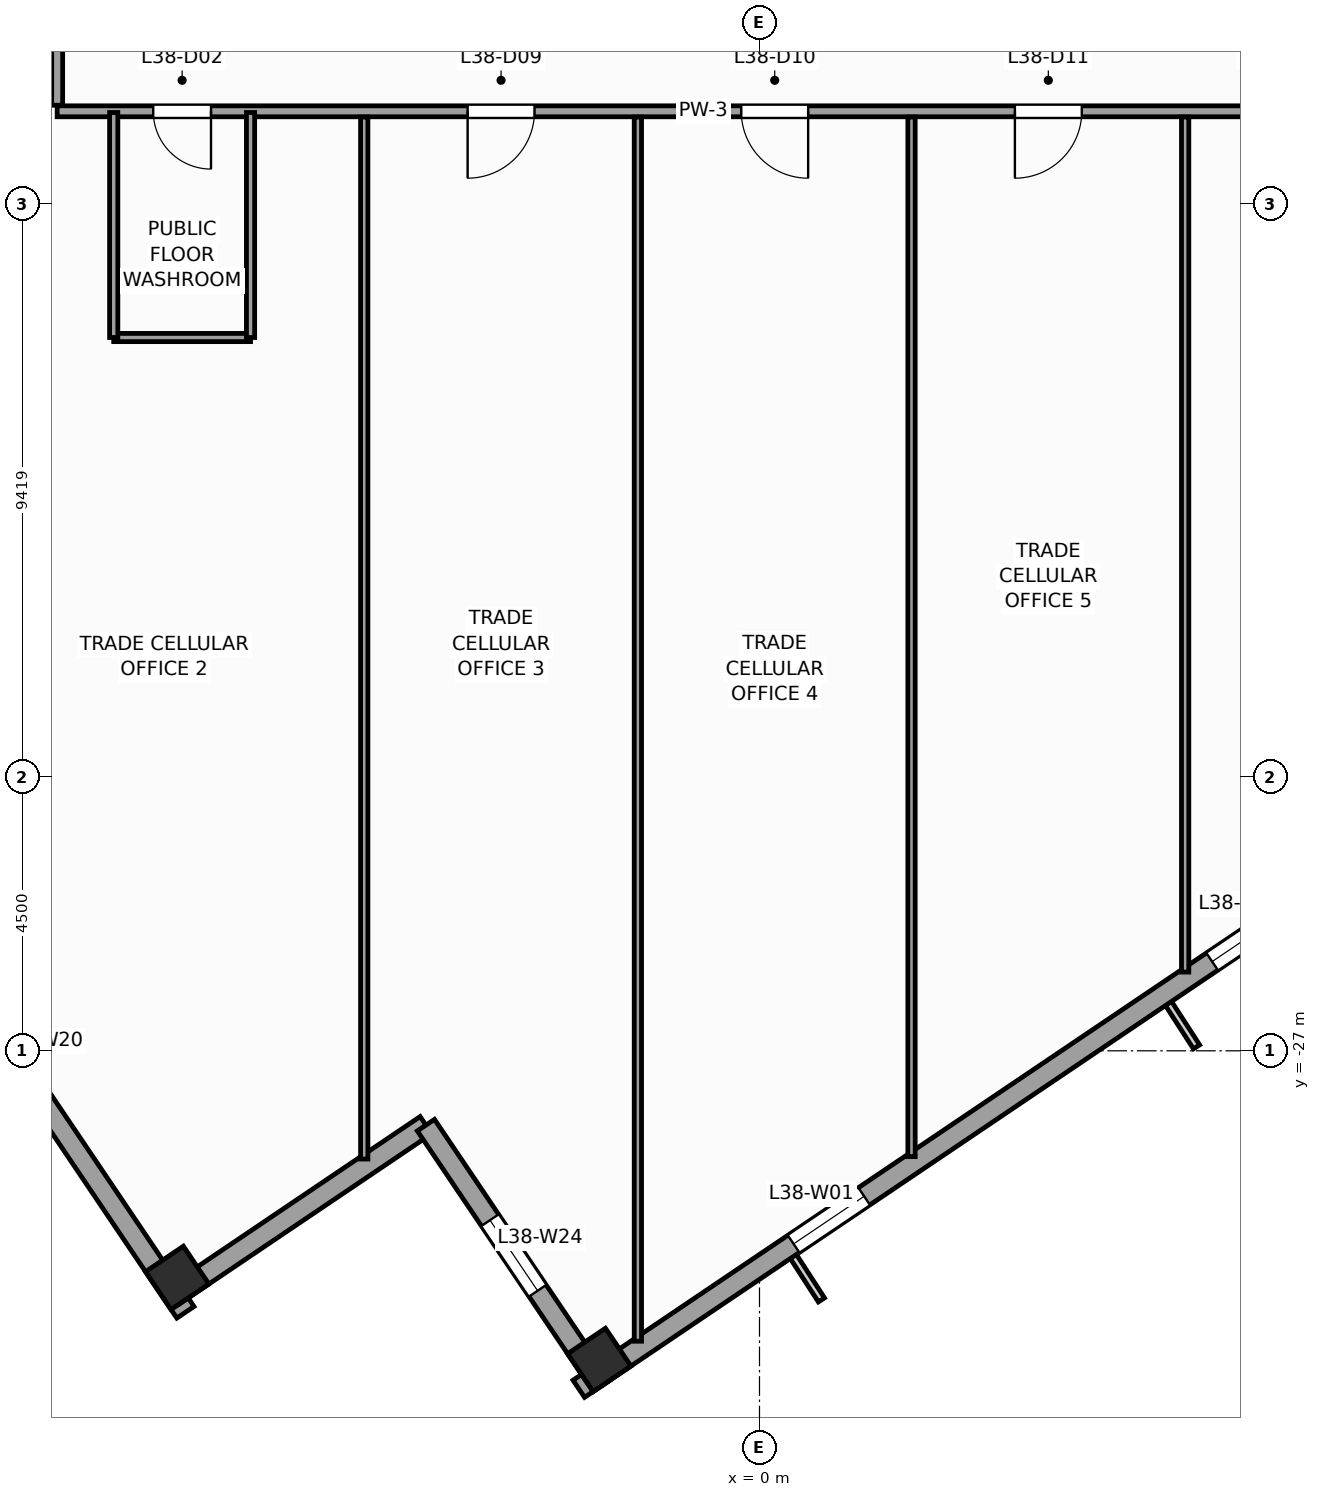
"""IFC4 building model, lengths in metres.
Left out: names, types, materials, properties, quantities, classifications, styles, units other than length and angle.
Written with IfcOpenShell. Run it as: python <this file> out.ifc"""

import sys

from ifc_helpers import new_model, si_unit, direction, frame, frame_2d, origin, origin_2d, place, context, subcontext, project, spatial, rectangle, extrude, source, transform, mapped, element, fill, save


model = new_model("IFC4")
c1 = context("Model", 3, precision=1e-05, world=origin(), true_north=direction((0.0, 1.0)))
c2 = subcontext(c1, "Body", "Model", "MODEL_VIEW")
j1 = project(units=[si_unit("LENGTHUNIT", "METRE"), si_unit("PLANEANGLEUNIT", "RADIAN")], contexts=[c1])
p1 = place(None, origin())
s1 = spatial("IfcSite", under=j1, at=p1, CompositionType="ELEMENT")
p2 = place(p1, origin())
s2 = spatial("IfcBuilding", under=s1, at=p2, CompositionType="ELEMENT")
p3 = place(p2, frame((0.0, 0.0, 160.4)))
s3 = spatial("IfcBuildingStorey", under=s2, at=p3, CompositionType="ELEMENT", Elevation=160.4)
m1 = source(origin(), c2, "Body", "SweptSolid", [
    extrude(rectangle(XDim=0.75, YDim=0.75, at=origin_2d()), origin(), (0.0, 0.0, 1.0), 4.0),
])
for number, where, z_axis, x_axis in (
    (1, (-2.635, -32.083, 0.0), (0.0, 0.0, 1.0), (0.829, 0.559, 0.0)),
    (2, (-9.576, -30.734, 0.0), (0.0, 0.0, 1.0), (0.829, 0.559, 0.0)),
):
    element("IfcColumn", number, at=place(p3, frame(where, z_axis=z_axis, x_axis=x_axis)), inside=s3, PredefinedType="COLUMN", context=c2, shape_type="MappedRepresentation", body=[
        mapped(m1, transform((0.0, 0.0, 0.0), scale=1.0)),
    ])
p4 = place(p3, frame((-2.972, -32.558, 0.0), z_axis=(0.0, 0.0, 1.0), x_axis=(0.829036218961, 0.559194910251, 0.0)))
e3 = element("IfcWall", 3, at=p4, inside=s3, PredefinedType="STANDARD", context=c2, shape_type="SweptSolid", body=[
    extrude(rectangle(XDim=41.34, YDim=0.34, at=frame_2d((20.67, 0.0))), origin(), (0.0, 0.0, 1.0), 3.04),
])
p5 = place(p4, frame((25.745, 0.0, 0.0)))
e4 = element("IfcOpeningElement", 4, at=p5, cuts=e3, PredefinedType="OPENING", context=c2, shape_type="SweptSolid", body=[
    extrude(rectangle(XDim=1.05, YDim=2.25, at=frame_2d((0.525, 1.125))), frame((0.0, 0.18, 0.0), z_axis=(0.0, -1.0, 0.0), x_axis=(1.0, 0.0, 0.0)), (0.0, 0.0, 1.0), 0.36),
])
p6 = place(p4, frame((4.261, 0.0, 0.56)))
e5 = element("IfcOpeningElement", 5, at=p6, cuts=e3, PredefinedType="OPENING", context=c2, shape_type="SweptSolid", body=[
    extrude(rectangle(XDim=1.4, YDim=2.4, at=frame_2d((0.7, 1.2))), frame((0.0, 0.18, 0.0), z_axis=(0.0, -1.0, 0.0), x_axis=(1.0, 0.0, 0.0)), (0.0, 0.0, 1.0), 0.36),
])
p7 = place(p4, frame((12.564, 0.0, 0.61)))
e6 = element("IfcOpeningElement", 6, at=p7, cuts=e3, PredefinedType="OPENING", context=c2, shape_type="SweptSolid", body=[
    extrude(rectangle(XDim=1.85, YDim=2.35, at=frame_2d((0.925, 1.175))), frame((0.0, 0.18, 0.0), z_axis=(0.0, -1.0, 0.0), x_axis=(1.0, 0.0, 0.0)), (0.0, 0.0, 1.0), 0.36),
])
p8 = place(p4, frame((16.668, 0.0, 0.61)))
e7 = element("IfcOpeningElement", 7, at=p8, cuts=e3, PredefinedType="OPENING", context=c2, shape_type="SweptSolid", body=[
    extrude(rectangle(XDim=1.85, YDim=2.35, at=frame_2d((0.925, 1.175))), frame((0.0, 0.18, 0.0), z_axis=(0.0, -1.0, 0.0), x_axis=(1.0, 0.0, 0.0)), (0.0, 0.0, 1.0), 0.36),
])
p9 = place(p4, frame((27.936, 0.0, 0.61)))
e8 = element("IfcOpeningElement", 8, at=p9, cuts=e3, PredefinedType="OPENING", context=c2, shape_type="SweptSolid", body=[
    extrude(rectangle(XDim=1.85, YDim=2.35, at=frame_2d((0.925, 1.175))), frame((0.0, 0.18, 0.0), z_axis=(0.0, -1.0, 0.0), x_axis=(1.0, 0.0, 0.0)), (0.0, 0.0, 1.0), 0.36),
])
p10 = place(p4, frame((34.852, 0.0, 0.56)))
e9 = element("IfcOpeningElement", 9, at=p10, cuts=e3, PredefinedType="OPENING", context=c2, shape_type="SweptSolid", body=[
    extrude(rectangle(XDim=1.4, YDim=2.4, at=frame_2d((0.7, 1.2))), frame((0.0, 0.18, 0.0), z_axis=(0.0, -1.0, 0.0), x_axis=(1.0, 0.0, 0.0)), (0.0, 0.0, 1.0), 0.36),
])
p11 = place(p3, frame((-32.558, 2.972, 0.0), z_axis=(0.0, 0.0, 1.0), x_axis=(0.559194910251, -0.829036218961, 0.0)))
e10 = element("IfcWall", 10, at=p11, inside=s3, PredefinedType="STANDARD", context=c2, shape_type="SweptSolid", body=[
    extrude(rectangle(XDim=41.34, YDim=0.34, at=frame_2d((20.67, 0.0))), origin(), (0.0, 0.0, 1.0), 3.04),
])
p12 = place(p11, frame((5.761, 0.0, 0.56)))
e11 = element("IfcOpeningElement", 11, at=p12, cuts=e10, PredefinedType="OPENING", context=c2, shape_type="SweptSolid", body=[
    extrude(rectangle(XDim=1.4, YDim=2.4, at=frame_2d((0.7, 1.2))), frame((0.0, 0.18, 0.0), z_axis=(0.0, -1.0, 0.0), x_axis=(1.0, 0.0, 0.0)), (0.0, 0.0, 1.0), 0.36),
])
p13 = place(p11, frame((11.064, 0.0, 0.61)))
e12 = element("IfcOpeningElement", 12, at=p13, cuts=e10, PredefinedType="OPENING", context=c2, shape_type="SweptSolid", body=[
    extrude(rectangle(XDim=1.85, YDim=2.35, at=frame_2d((0.925, 1.175))), frame((0.0, 0.18, 0.0), z_axis=(0.0, -1.0, 0.0), x_axis=(1.0, 0.0, 0.0)), (0.0, 0.0, 1.0), 0.36),
])
p14 = place(p11, frame((18.168, 0.0, 0.61)))
e13 = element("IfcOpeningElement", 13, at=p14, cuts=e10, PredefinedType="OPENING", context=c2, shape_type="SweptSolid", body=[
    extrude(rectangle(XDim=1.85, YDim=2.35, at=frame_2d((0.925, 1.175))), frame((0.0, 0.18, 0.0), z_axis=(0.0, -1.0, 0.0), x_axis=(1.0, 0.0, 0.0)), (0.0, 0.0, 1.0), 0.36),
])
p15 = place(p11, frame((27.186, 0.0, 0.61)))
e14 = element("IfcOpeningElement", 14, at=p15, cuts=e10, PredefinedType="OPENING", context=c2, shape_type="SweptSolid", body=[
    extrude(rectangle(XDim=1.85, YDim=2.35, at=frame_2d((0.925, 1.175))), frame((0.0, 0.18, 0.0), z_axis=(0.0, -1.0, 0.0), x_axis=(1.0, 0.0, 0.0)), (0.0, 0.0, 1.0), 0.36),
])
p16 = place(p11, frame((35.602, 0.0, 0.56)))
e15 = element("IfcOpeningElement", 15, at=p16, cuts=e10, PredefinedType="OPENING", context=c2, shape_type="SweptSolid", body=[
    extrude(rectangle(XDim=1.4, YDim=2.4, at=frame_2d((0.7, 1.2))), frame((0.0, 0.18, 0.0), z_axis=(0.0, -1.0, 0.0), x_axis=(1.0, 0.0, 0.0)), (0.0, 0.0, 1.0), 0.36),
])
p17 = place(p3, frame((-9.631, -31.019, 0.0), z_axis=(0.0, 0.0, 1.0), x_axis=(0.829025804298, 0.559210350234, 0.0)))
e16 = element("IfcWall", 16, at=p17, inside=s3, PredefinedType="STANDARD", context=c2, shape_type="SweptSolid", body=[
    extrude(rectangle(XDim=5.0, YDim=0.34, at=frame_2d((2.5, 0.0))), origin(), (0.0, 0.0, 1.0), 3.74),
])
p18 = place(p3, frame((-5.486, -28.223, 0.0), z_axis=(0.0, 0.0, 1.0), x_axis=(0.559171107879, -0.82905227345, 0.0)))
e17 = element("IfcWall", 17, at=p18, inside=s3, PredefinedType="STANDARD", context=c2, shape_type="SweptSolid", body=[
    extrude(rectangle(XDim=5.17, YDim=0.34, at=frame_2d((2.585, 0.0))), origin(), (0.0, 0.0, 1.0), 3.04),
])
p19 = place(p18, frame((1.885, 0.0, 0.56)))
e18 = element("IfcOpeningElement", 18, at=p19, cuts=e17, PredefinedType="OPENING", context=c2, shape_type="SweptSolid", body=[
    extrude(rectangle(XDim=1.4, YDim=2.4, at=frame_2d((0.7, 1.2))), frame((0.0, 0.18, 0.0), z_axis=(0.0, -1.0, 0.0), x_axis=(1.0, 0.0, 0.0)), (0.0, 0.0, 1.0), 0.36),
])
p20 = place(p3, frame((-11.55, -11.55, 0.0), z_axis=(0.0, 0.0, 1.0), x_axis=(1.0, 0.0, 0.0)))
e19 = element("IfcWall", 19, at=p20, inside=s3, PredefinedType="PARTITIONING", context=c2, shape_type="SweptSolid", body=[
    extrude(rectangle(XDim=22.0, YDim=0.18, at=frame_2d((11.0, 0.0))), origin(), (0.0, 0.0, 1.0), 3.74),
])
p21 = place(p20, frame((1.58, 0.0, 0.0)))
e20 = element("IfcOpeningElement", 20, at=p21, cuts=e19, PredefinedType="OPENING", context=c2, shape_type="SweptSolid", body=[
    extrude(rectangle(XDim=0.95, YDim=2.1, at=frame_2d((0.475, 1.05))), frame((0.0, 0.1, 0.0), z_axis=(0.0, -1.0, 0.0), x_axis=(1.0, 0.0, 0.0)), (0.0, 0.0, 1.0), 0.2),
])
p22 = place(p20, frame((6.75, 0.0, 0.0)))
e21 = element("IfcOpeningElement", 21, at=p22, cuts=e19, PredefinedType="OPENING", context=c2, shape_type="SweptSolid", body=[
    extrude(rectangle(XDim=1.1, YDim=2.2, at=frame_2d((0.55, 1.1))), frame((0.0, 0.1, 0.0), z_axis=(0.0, -1.0, 0.0), x_axis=(1.0, 0.0, 0.0)), (0.0, 0.0, 1.0), 0.2),
])
p23 = place(p20, frame((11.25, 0.0, 0.0)))
e22 = element("IfcOpeningElement", 22, at=p23, cuts=e19, PredefinedType="OPENING", context=c2, shape_type="SweptSolid", body=[
    extrude(rectangle(XDim=1.1, YDim=2.2, at=frame_2d((0.55, 1.1))), frame((0.0, 0.1, 0.0), z_axis=(0.0, -1.0, 0.0), x_axis=(1.0, 0.0, 0.0)), (0.0, 0.0, 1.0), 0.2),
])
p24 = place(p20, frame((15.75, 0.0, 0.0)))
e23 = element("IfcOpeningElement", 23, at=p24, cuts=e19, PredefinedType="OPENING", context=c2, shape_type="SweptSolid", body=[
    extrude(rectangle(XDim=1.1, YDim=2.2, at=frame_2d((0.55, 1.1))), frame((0.0, 0.1, 0.0), z_axis=(0.0, -1.0, 0.0), x_axis=(1.0, 0.0, 0.0)), (0.0, 0.0, 1.0), 0.2),
])
p25 = place(p20, frame((19.561, 0.0, 0.0)))
e24 = element("IfcOpeningElement", 24, at=p25, cuts=e19, PredefinedType="OPENING", context=c2, shape_type="SweptSolid", body=[
    extrude(rectangle(XDim=1.1, YDim=2.2, at=frame_2d((0.55, 1.1))), frame((0.0, 0.1, 0.0), z_axis=(0.0, -1.0, 0.0), x_axis=(1.0, 0.0, 0.0)), (0.0, 0.0, 1.0), 0.2),
])
p26 = place(p3, frame((-11.55, -11.45, 0.0), z_axis=(0.0, 0.0, 1.0), x_axis=(0.0, 1.0, 0.0)))
e25 = element("IfcWall", 25, at=p26, inside=s3, PredefinedType="PARTITIONING", context=c2, shape_type="SweptSolid", body=[
    extrude(rectangle(XDim=13.05, YDim=0.18, at=frame_2d((6.525, 0.0))), origin(), (0.0, 0.0, 1.0), 3.74),
])
p27 = place(p26, frame((4.086, 0.0, 0.0)))
e26 = element("IfcOpeningElement", 26, at=p27, cuts=e25, PredefinedType="OPENING", context=c2, shape_type="SweptSolid", body=[
    extrude(rectangle(XDim=0.95, YDim=2.1, at=frame_2d((0.475, 1.05))), frame((0.0, 0.1, 0.0), z_axis=(0.0, -1.0, 0.0), x_axis=(1.0, 0.0, 0.0)), (0.0, 0.0, 1.0), 0.2),
])
p28 = place(p26, frame((11.01, 0.0, 0.0)))
e27 = element("IfcOpeningElement", 27, at=p28, cuts=e25, PredefinedType="OPENING", context=c2, shape_type="SweptSolid", body=[
    extrude(rectangle(XDim=1.1, YDim=2.2, at=frame_2d((0.55, 1.1))), frame((0.0, 0.1, 0.0), z_axis=(0.0, -1.0, 0.0), x_axis=(1.0, 0.0, 0.0)), (0.0, 0.0, 1.0), 0.2),
])
p29 = place(p26, frame((8.775, 0.0, 0.0)))
e28 = element("IfcOpeningElement", 28, at=p29, cuts=e25, PredefinedType="OPENING", context=c2, shape_type="SweptSolid", body=[
    extrude(rectangle(XDim=1.1, YDim=2.2, at=frame_2d((0.55, 1.1))), frame((0.0, 0.1, 0.0), z_axis=(0.0, -1.0, 0.0), x_axis=(1.0, 0.0, 0.0)), (0.0, 0.0, 1.0), 0.2),
])
p30 = place(p26, frame((6.35, 0.0, 0.0)))
e29 = element("IfcOpeningElement", 29, at=p30, cuts=e25, PredefinedType="OPENING", context=c2, shape_type="SweptSolid", body=[
    extrude(rectangle(XDim=1.1, YDim=2.2, at=frame_2d((0.55, 1.1))), frame((0.0, 0.1, 0.0), z_axis=(0.0, -1.0, 0.0), x_axis=(1.0, 0.0, 0.0)), (0.0, 0.0, 1.0), 0.2),
])
p31 = place(p26, frame((1.24, 0.0, 0.0)))
e30 = element("IfcOpeningElement", 30, at=p31, cuts=e25, PredefinedType="OPENING", context=c2, shape_type="SweptSolid", body=[
    extrude(rectangle(XDim=1.1, YDim=2.2, at=frame_2d((0.55, 1.1))), frame((0.0, 0.1, 0.0), z_axis=(0.0, -1.0, 0.0), x_axis=(1.0, 0.0, 0.0)), (0.0, 0.0, 1.0), 0.2),
])
p32 = place(p3, frame((-6.5, -28.78, 0.0), z_axis=(0.0, 0.0, 1.0), x_axis=(0.0, 1.0, 0.0)))
e31 = element("IfcWall", 31, at=p32, inside=s3, PredefinedType="PARTITIONING", context=c2, shape_type="SweptSolid", body=[
    extrude(rectangle(XDim=17.135, YDim=0.12, at=frame_2d((8.567, 0.0))), origin(), (0.0, 0.0, 1.0), 3.74),
])
p33 = place(p3, frame((-2.0, -31.776, 0.0), z_axis=(0.0, 0.0, 1.0), x_axis=(0.0, 1.0, 0.0)))
e32 = element("IfcWall", 32, at=p33, inside=s3, PredefinedType="PARTITIONING", context=c2, shape_type="SweptSolid", body=[
    extrude(rectangle(XDim=20.131, YDim=0.12, at=frame_2d((10.065, 0.0))), origin(), (0.0, 0.0, 1.0), 3.74),
])
p34 = place(p3, frame((2.5, -28.74, 0.0), z_axis=(0.0, 0.0, 1.0), x_axis=(0.0, 1.0, 0.0)))
e33 = element("IfcWall", 33, at=p34, inside=s3, PredefinedType="PARTITIONING", context=c2, shape_type="SweptSolid", body=[
    extrude(rectangle(XDim=17.095, YDim=0.12, at=frame_2d((8.548, 0.0))), origin(), (0.0, 0.0, 1.0), 3.74),
])
p35 = place(p3, frame((7.0, -25.705, 0.0), z_axis=(0.0, 0.0, 1.0), x_axis=(0.0, 1.0, 0.0)))
e34 = element("IfcWall", 34, at=p35, inside=s3, PredefinedType="PARTITIONING", context=c2, shape_type="SweptSolid", body=[
    extrude(rectangle(XDim=14.06, YDim=0.12, at=frame_2d((7.03, 0.0))), origin(), (0.0, 0.0, 1.0), 3.74),
])
p36 = place(p3, frame((-10.62, -15.27, 0.0), z_axis=(0.0, 0.0, 1.0), x_axis=(1.0, 0.0, 0.0)))
e35 = element("IfcWall", 35, at=p36, inside=s3, PredefinedType="PARTITIONING", context=c2, shape_type="SweptSolid", body=[
    extrude(rectangle(XDim=2.25, YDim=0.135, at=frame_2d((1.125, 0.0))), origin(), (0.0, 0.0, 1.0), 3.74),
])
for number, where, z_axis, x_axis in (
    (36, (-8.37, -15.27, 0.0), (0.0, 0.0, 1.0), (0.0, 1.0, 0.0)),
    (37, (-10.62, -15.27, 0.0), (0.0, 0.0, 1.0), (0.0, 1.0, 0.0)),
):
    element("IfcWall", number, at=place(p3, frame(where, z_axis=z_axis, x_axis=x_axis)), inside=s3, PredefinedType="PARTITIONING", context=c2, shape_type="SweptSolid", body=[
        extrude(rectangle(XDim=3.7, YDim=0.135, at=frame_2d((1.85, 0.0))), origin(), (0.0, 0.0, 1.0), 3.74),
    ])
m2 = source(origin(), c2, "Body", "SweptSolid", [
    extrude(rectangle(XDim=1.4, YDim=2.4, at=frame_2d((0.7, 1.2))), frame((0.0, 0.03, 0.0), z_axis=(0.0, -1.0, 0.0), x_axis=(1.0, 0.0, 0.0)), (0.0, 0.0, 1.0), 0.06),
])
p37 = place(p6, origin())
e38 = element("IfcWindow", 38, at=p37, inside=s3, PartitioningType="SINGLE_PANEL", PredefinedType="WINDOW", context=c2, shape_type="MappedRepresentation", body=[
    mapped(m2, transform((0.0, 0.0, 0.0), scale=1.0)),
])
fill(e5, e38)
m3 = source(origin(), c2, "Body", "SweptSolid", [
    extrude(rectangle(XDim=1.85, YDim=2.35, at=frame_2d((0.925, 1.175))), frame((0.0, 0.03, 0.0), z_axis=(0.0, -1.0, 0.0), x_axis=(1.0, 0.0, 0.0)), (0.0, 0.0, 1.0), 0.06),
])
p38 = place(p7, origin())
e39 = element("IfcWindow", 39, at=p38, inside=s3, PartitioningType="SINGLE_PANEL", PredefinedType="WINDOW", context=c2, shape_type="MappedRepresentation", body=[
    mapped(m3, transform((0.0, 0.0, 0.0), scale=1.0)),
])
fill(e6, e39)
p39 = place(p19, origin())
e40 = element("IfcWindow", 40, at=p39, inside=s3, PartitioningType="SINGLE_PANEL", PredefinedType="WINDOW", context=c2, shape_type="MappedRepresentation", body=[
    mapped(m2, transform((0.0, 0.0, 0.0), scale=1.0)),
])
fill(e18, e40)
m4 = source(origin(), c2, "Body", "SweptSolid", [
    extrude(rectangle(XDim=0.95, YDim=2.1, at=frame_2d((0.475, 1.05))), frame((0.0, 0.025, 0.0), z_axis=(0.0, -1.0, 0.0), x_axis=(1.0, 0.0, 0.0)), (0.0, 0.0, 1.0), 0.05),
])
p40 = place(p21, frame((0.95, 0.0, 0.0), z_axis=(0.0, 0.0, 1.0), x_axis=(-1.0, 0.0, 0.0)))
e41 = element("IfcDoor", 41, at=p40, inside=s3, OperationType="SINGLE_SWING_RIGHT", PredefinedType="DOOR", context=c2, shape_type="MappedRepresentation", body=[
    mapped(m4, transform((0.0, 0.0, 0.0), scale=1.0)),
])
fill(e20, e41)
m5 = source(origin(), c2, "Body", "SweptSolid", [
    extrude(rectangle(XDim=1.1, YDim=2.2, at=frame_2d((0.55, 1.1))), frame((0.0, 0.025, 0.0), z_axis=(0.0, -1.0, 0.0), x_axis=(1.0, 0.0, 0.0)), (0.0, 0.0, 1.0), 0.05),
])
p41 = place(p22, frame((1.1, 0.0, 0.0), z_axis=(0.0, 0.0, 1.0), x_axis=(-1.0, 0.0, 0.0)))
e42 = element("IfcDoor", 42, at=p41, inside=s3, OperationType="SINGLE_SWING_LEFT", PredefinedType="DOOR", context=c2, shape_type="MappedRepresentation", body=[
    mapped(m5, transform((0.0, 0.0, 0.0), scale=1.0)),
])
fill(e21, e42)
p42 = place(p23, frame((1.1, 0.0, 0.0), z_axis=(0.0, 0.0, 1.0), x_axis=(-1.0, 0.0, 0.0)))
e43 = element("IfcDoor", 43, at=p42, inside=s3, OperationType="SINGLE_SWING_RIGHT", PredefinedType="DOOR", context=c2, shape_type="MappedRepresentation", body=[
    mapped(m5, transform((0.0, 0.0, 0.0), scale=1.0)),
])
fill(e22, e43)
p43 = place(p24, frame((1.1, 0.0, 0.0), z_axis=(0.0, 0.0, 1.0), x_axis=(-1.0, 0.0, 0.0)))
e44 = element("IfcDoor", 44, at=p43, inside=s3, OperationType="SINGLE_SWING_LEFT", PredefinedType="DOOR", context=c2, shape_type="MappedRepresentation", body=[
    mapped(m5, transform((0.0, 0.0, 0.0), scale=1.0)),
])
fill(e23, e44)
save(model, sys.argv[1])
